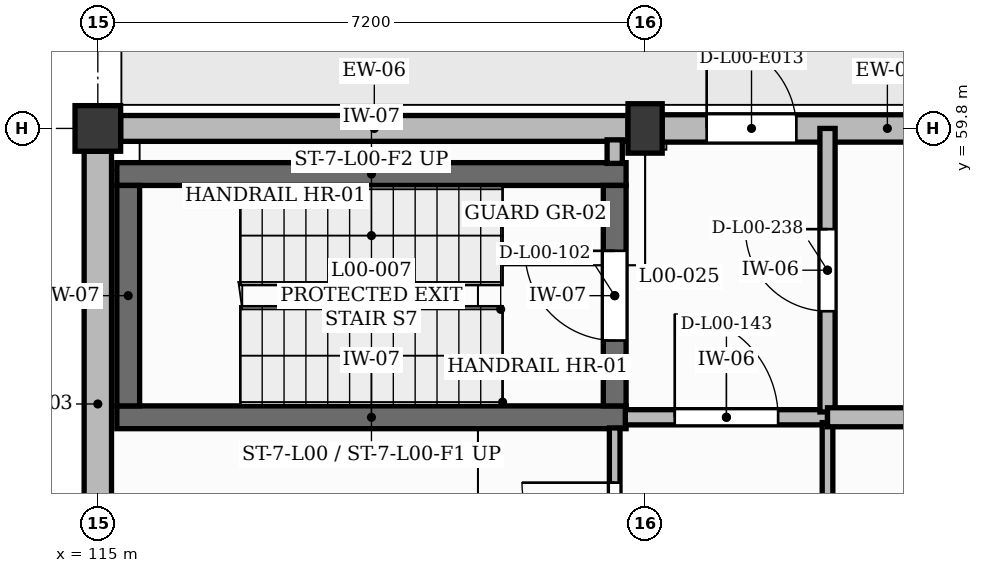
"""IFC4 building model, lengths in metres.
Left out: names, types, materials, properties, quantities, classifications, styles, units other than length and angle.
Written with IfcOpenShell. Run it as: python <this file> out.ifc"""

import sys

from ifc_helpers import new_model, si_unit, direction, frame, frame_2d, origin, origin_2d, place, context, subcontext, project, spatial, rectangle, extrude, element, fill, save


model = new_model("IFC4")
c1 = context("Model", 3, precision=1e-05, world=origin(), true_north=direction((0.0, 1.0)))
c2 = subcontext(c1, "Body", "Model", "MODEL_VIEW")
j1 = project(units=[si_unit("LENGTHUNIT", "METRE"), si_unit("PLANEANGLEUNIT", "RADIAN")], contexts=[c1])
p1 = place(None, origin())
s1 = spatial("IfcSite", under=j1, at=p1, CompositionType="ELEMENT")
p2 = place(p1, origin())
s2 = spatial("IfcBuilding", under=s1, at=p2, CompositionType="ELEMENT")
p3 = place(p2, origin())
s3 = spatial("IfcBuildingStorey", under=s2, at=p3, CompositionType="ELEMENT", Elevation=0.0)
p4 = place(p3, frame((115.0, 59.8, 0.0), z_axis=(0.0, 0.0, 1.0), x_axis=(1.0, 0.0, 0.0)))
e1 = element("IfcColumn", 1, at=p4, inside=s3, PredefinedType="COLUMN", context=c2, shape_type="SweptSolid", body=[
    extrude(rectangle(XDim=0.6, YDim=0.6, at=origin_2d()), origin(), (0.0, 0.0, 1.0), 4.2),
])
p5 = place(p3, frame((122.2, 59.8, 0.0), z_axis=(0.0, 0.0, 1.0), x_axis=(1.0, 0.0, 0.0)))
e2 = element("IfcColumn", 2, at=p5, inside=s3, PredefinedType="COLUMN", context=c2, shape_type="SweptSolid", body=[
    extrude(rectangle(XDim=0.45, YDim=0.65, at=origin_2d()), origin(), (0.0, 0.0, 1.0), 4.2),
])
p6 = place(p3, frame((115.3, 59.8, 0.0), z_axis=(0.0, 0.0, 1.0), x_axis=(1.0, 0.0, 0.0)))
e3 = element("IfcWall", 3, at=p6, inside=s3, PredefinedType="SOLIDWALL", context=c2, shape_type="SweptSolid", body=[
    extrude(rectangle(XDim=6.675, YDim=0.34, at=frame_2d((3.337, 0.0))), origin(), (0.0, 0.0, 1.0), 3.68),
])
p7 = place(p3, frame((115.0, 52.85, 0.0), z_axis=(0.0, 0.0, 1.0), x_axis=(0.0, 1.0, 0.0)))
e4 = element("IfcWall", 4, at=p7, inside=s3, PredefinedType="SOLIDWALL", context=c2, shape_type="SweptSolid", body=[
    extrude(rectangle(XDim=6.65, YDim=0.36, at=frame_2d((3.325, 0.0))), origin(), (0.0, 0.0, 1.0), 3.68),
])
p8 = place(p3, frame((122.425, 59.8, 0.0), z_axis=(0.0, 0.0, 1.0), x_axis=(1.0, 0.0, 0.0)))
e5 = element("IfcWall", 5, at=p8, inside=s3, PredefinedType="SOLIDWALL", context=c2, shape_type="SweptSolid", body=[
    extrude(rectangle(XDim=5.925, YDim=0.36, at=frame_2d((2.962, 0.0))), origin(), (0.0, 0.0, 1.0), 3.68),
])
p9 = place(p8, frame((0.585, 0.0, 0.0)))
e6 = element("IfcOpeningElement", 6, at=p9, cuts=e5, PredefinedType="OPENING", context=c2, shape_type="SweptSolid", body=[
    extrude(rectangle(XDim=1.18, YDim=2.2, at=frame_2d((0.59, 1.1))), frame((0.0, 0.19, 0.0), z_axis=(0.0, -1.0, 0.0), x_axis=(1.0, 0.0, 0.0)), (0.0, 0.0, 1.0), 0.38),
])
p10 = place(p8, frame((3.315, 0.0, 1.0)))
e7 = element("IfcOpeningElement", 7, at=p10, cuts=e5, PredefinedType="OPENING", context=c2, shape_type="SweptSolid", body=[
    extrude(rectangle(XDim=1.35, YDim=2.2, at=frame_2d((0.675, 1.1))), frame((0.0, 0.19, 0.0), z_axis=(0.0, -1.0, 0.0), x_axis=(1.0, 0.0, 0.0)), (0.0, 0.0, 1.0), 0.38),
])
for number, where, z_axis, x_axis in (
    (8, (115.25, 56.0, 0.0), (0.0, 0.0, 1.0), (1.0, 0.0, 0.0)),
    (9, (115.25, 59.2, 0.0), (0.0, 0.0, 1.0), (1.0, 0.0, 0.0)),
):
    element("IfcWall", number, at=place(p3, frame(where, z_axis=z_axis, x_axis=x_axis)), inside=s3, PredefinedType="SHEAR", context=c2, shape_type="SweptSolid", body=[
        extrude(rectangle(XDim=6.7, YDim=0.3, at=frame_2d((3.35, 0.0))), origin(), (0.0, 0.0, 1.0), 4.25),
    ])
p11 = place(p3, frame((115.4, 56.15, 0.0), z_axis=(0.0, 0.0, 1.0), x_axis=(0.0, 1.0, 0.0)))
e10 = element("IfcWall", 10, at=p11, inside=s3, PredefinedType="SHEAR", context=c2, shape_type="SweptSolid", body=[
    extrude(rectangle(XDim=2.9, YDim=0.3, at=frame_2d((1.45, 0.0))), origin(), (0.0, 0.0, 1.0), 4.25),
])
p12 = place(p3, frame((121.8, 56.15, 0.0), z_axis=(0.0, 0.0, 1.0), x_axis=(0.0, 1.0, 0.0)))
e11 = element("IfcWall", 11, at=p12, inside=s3, PredefinedType="SHEAR", context=c2, shape_type="SweptSolid", body=[
    extrude(rectangle(XDim=2.9, YDim=0.3, at=frame_2d((1.45, 0.0))), origin(), (0.0, 0.0, 1.0), 4.25),
])
p13 = place(p12, frame((0.86, 0.0, 0.0)))
e12 = element("IfcOpeningElement", 12, at=p13, cuts=e11, PredefinedType="OPENING", context=c2, shape_type="SweptSolid", body=[
    extrude(rectangle(XDim=1.18, YDim=2.15, at=frame_2d((0.59, 1.075))), frame((0.0, 0.16, 0.0), z_axis=(0.0, -1.0, 0.0), x_axis=(1.0, 0.0, 0.0)), (0.0, 0.0, 1.0), 0.32),
])
p14 = place(p3, frame((121.8, 53.2, 0.0), z_axis=(0.0, 0.0, 1.0), x_axis=(0.0, 1.0, 0.0)))
e13 = element("IfcWall", 13, at=p14, inside=s3, PredefinedType="PARTITIONING", context=c2, shape_type="SweptSolid", body=[
    extrude(rectangle(XDim=2.66, YDim=0.14, at=frame_2d((1.33, 0.0))), origin(), (0.0, 0.0, 1.0), 4.18),
])
p15 = place(p14, frame((0.72, 0.0, 0.0)))
e14 = element("IfcOpeningElement", 14, at=p15, cuts=e13, PredefinedType="OPENING", context=c2, shape_type="SweptSolid", body=[
    extrude(rectangle(XDim=1.22, YDim=2.1, at=frame_2d((0.61, 1.05))), frame((0.0, 0.08, 0.0), z_axis=(0.0, -1.0, 0.0), x_axis=(1.0, 0.0, 0.0)), (0.0, 0.0, 1.0), 0.16),
])
p16 = place(p3, frame((121.94, 56.0, 0.0), z_axis=(0.0, 0.0, 1.0), x_axis=(1.0, 0.0, 0.0)))
e15 = element("IfcWall", 15, at=p16, inside=s3, PredefinedType="PARTITIONING", context=c2, shape_type="SweptSolid", body=[
    extrude(rectangle(XDim=2.66, YDim=0.2, at=frame_2d((1.33, 0.0))), origin(), (0.0, 0.0, 1.0), 4.18),
])
p17 = place(p16, frame((0.65, 0.0, 0.0)))
e16 = element("IfcOpeningElement", 16, at=p17, cuts=e15, PredefinedType="OPENING", context=c2, shape_type="SweptSolid", body=[
    extrude(rectangle(XDim=1.36, YDim=2.2, at=frame_2d((0.68, 1.1))), frame((0.0, 0.11, 0.0), z_axis=(0.0, -1.0, 0.0), x_axis=(1.0, 0.0, 0.0)), (0.0, 0.0, 1.0), 0.22),
])
p18 = place(p3, frame((124.6, 52.67, 0.0), z_axis=(0.0, 0.0, 1.0), x_axis=(0.0, 1.0, 0.0)))
e17 = element("IfcWall", 17, at=p18, inside=s3, PredefinedType="PARTITIONING", context=c2, shape_type="SweptSolid", body=[
    extrude(rectangle(XDim=3.26, YDim=0.14, at=frame_2d((1.63, 0.0))), origin(), (0.0, 0.0, 1.0), 4.18),
])
p19 = place(p18, frame((1.02, 0.0, 0.0)))
e18 = element("IfcOpeningElement", 18, at=p19, cuts=e17, PredefinedType="OPENING", context=c2, shape_type="SweptSolid", body=[
    extrude(rectangle(XDim=1.22, YDim=2.1, at=frame_2d((0.61, 1.05))), frame((0.0, 0.08, 0.0), z_axis=(0.0, -1.0, 0.0), x_axis=(1.0, 0.0, 0.0)), (0.0, 0.0, 1.0), 0.16),
])
p20 = place(p3, frame((124.6, 56.07, 0.0), z_axis=(0.0, 0.0, 1.0), x_axis=(0.0, 1.0, 0.0)))
e19 = element("IfcWall", 19, at=p20, inside=s3, PredefinedType="PARTITIONING", context=c2, shape_type="SweptSolid", body=[
    extrude(rectangle(XDim=3.73, YDim=0.2, at=frame_2d((1.865, 0.0))), origin(), (0.0, 0.0, 1.0), 4.18),
])
p21 = place(p20, frame((1.325, 0.0, 0.0)))
e20 = element("IfcOpeningElement", 20, at=p21, cuts=e19, PredefinedType="OPENING", context=c2, shape_type="SweptSolid", body=[
    extrude(rectangle(XDim=1.08, YDim=2.15, at=frame_2d((0.54, 1.075))), frame((0.0, 0.11, 0.0), z_axis=(0.0, -1.0, 0.0), x_axis=(1.0, 0.0, 0.0)), (0.0, 0.0, 1.0), 0.22),
])
p22 = place(p3, frame((124.6, 56.0, 0.0), z_axis=(0.0, 0.0, 1.0), x_axis=(1.0, 0.0, 0.0)))
e21 = element("IfcWall", 21, at=p22, inside=s3, PredefinedType="SOLIDWALL", context=c2, shape_type="SweptSolid", body=[
    extrude(rectangle(XDim=4.795, YDim=0.25, at=frame_2d((2.397, 0.0))), origin(), (0.0, 0.0, 1.0), 4.18),
])
p23 = place(p3, frame((121.8, 59.34, 0.0), z_axis=(0.0, 0.0, 1.0), x_axis=(0.0, 1.0, 0.0)))
e22 = element("IfcWall", 22, at=p23, inside=s3, PredefinedType="PARTITIONING", context=c2, shape_type="SweptSolid", body=[
    extrude(rectangle(XDim=0.31, YDim=0.2, at=frame_2d((0.155, 0.0))), origin(), (0.0, 0.0, 1.0), 4.18),
])
p24 = place(p9, origin())
e23 = element("IfcDoor", 23, at=p24, inside=s3, OperationType="SINGLE_SWING_LEFT", PredefinedType="DOOR", context=c2, shape_type="SweptSolid", body=[
    extrude(rectangle(XDim=1.18, YDim=2.2, at=frame_2d((0.59, 1.1))), frame((0.0, 0.025, 0.0), z_axis=(0.0, -1.0, 0.0), x_axis=(1.0, 0.0, 0.0)), (0.0, 0.0, 1.0), 0.05),
])
fill(e6, e23)
p25 = place(p13, origin())
e24 = element("IfcDoor", 24, at=p25, inside=s3, OperationType="SINGLE_SWING_RIGHT", PredefinedType="DOOR", context=c2, shape_type="SweptSolid", body=[
    extrude(rectangle(XDim=1.18, YDim=2.15, at=frame_2d((0.59, 1.075))), frame((0.0, 0.025, 0.0), z_axis=(0.0, -1.0, 0.0), x_axis=(1.0, 0.0, 0.0)), (0.0, 0.0, 1.0), 0.05),
])
fill(e12, e24)
p26 = place(p15, origin())
e25 = element("IfcDoor", 25, at=p26, inside=s3, OperationType="SINGLE_SWING_RIGHT", PredefinedType="DOOR", context=c2, shape_type="SweptSolid", body=[
    extrude(rectangle(XDim=1.22, YDim=2.1, at=frame_2d((0.61, 1.05))), frame((0.0, 0.025, 0.0), z_axis=(0.0, -1.0, 0.0), x_axis=(1.0, 0.0, 0.0)), (0.0, 0.0, 1.0), 0.05),
])
fill(e14, e25)
p27 = place(p17, origin())
e26 = element("IfcDoor", 26, at=p27, inside=s3, OperationType="SINGLE_SWING_LEFT", PredefinedType="DOOR", context=c2, shape_type="SweptSolid", body=[
    extrude(rectangle(XDim=1.36, YDim=2.2, at=frame_2d((0.68, 1.1))), frame((0.0, 0.025, 0.0), z_axis=(0.0, -1.0, 0.0), x_axis=(1.0, 0.0, 0.0)), (0.0, 0.0, 1.0), 0.05),
])
fill(e16, e26)
p28 = place(p21, origin())
e27 = element("IfcDoor", 27, at=p28, inside=s3, OperationType="SINGLE_SWING_RIGHT", PredefinedType="DOOR", context=c2, shape_type="SweptSolid", body=[
    extrude(rectangle(XDim=1.08, YDim=2.15, at=frame_2d((0.54, 1.075))), frame((0.0, 0.025, 0.0), z_axis=(0.0, -1.0, 0.0), x_axis=(1.0, 0.0, 0.0)), (0.0, 0.0, 1.0), 0.05),
])
fill(e20, e27)
save(model, sys.argv[1])
